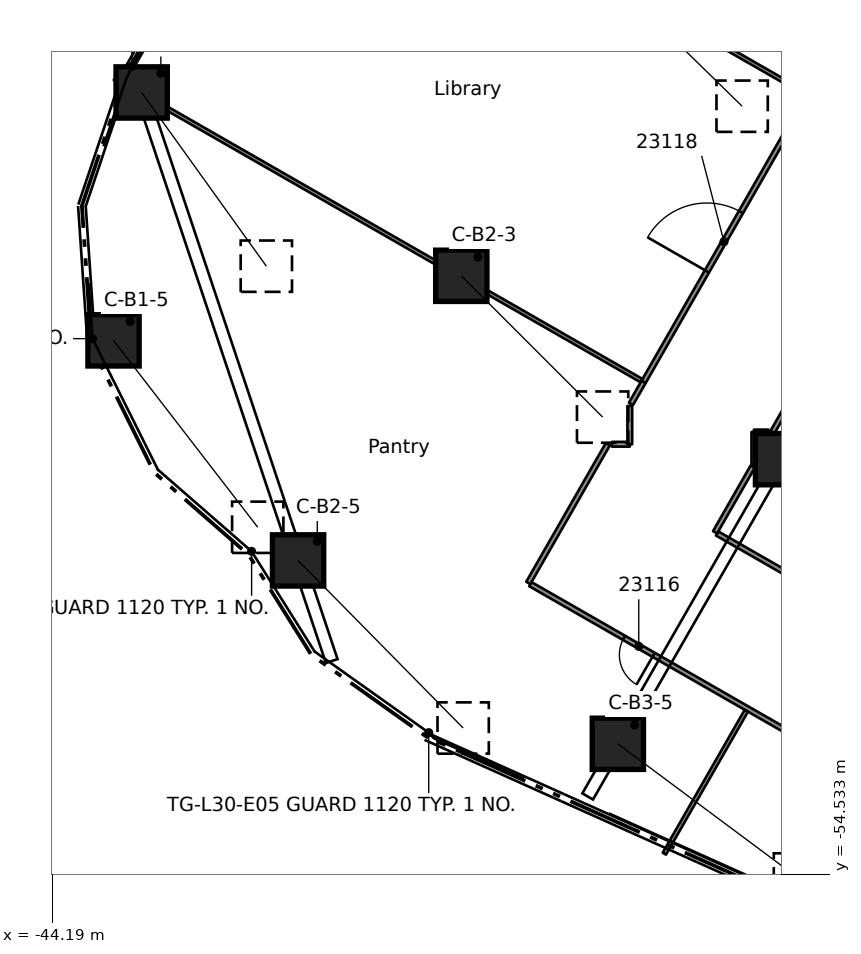
"""IFC4 building model, lengths in metres.
Left out: names, types, materials, properties, quantities, classifications, styles, units other than length and angle.
Written with IfcOpenShell. Run it as: python <this file> out.ifc"""

import sys

from ifc_helpers import new_model, si_unit, direction, frame, frame_2d, origin, origin_2d, place, context, subcontext, project, spatial, rectangle, extrude, element, fill, save


model = new_model("IFC4")
c1 = context("Model", 3, precision=1e-05, world=origin(), true_north=direction((0.0, 1.0)))
c2 = subcontext(c1, "Body", "Model", "MODEL_VIEW")
j1 = project(units=[si_unit("LENGTHUNIT", "METRE"), si_unit("PLANEANGLEUNIT", "RADIAN")], contexts=[c1])
p1 = place(None, origin())
s1 = spatial("IfcSite", under=j1, at=p1, CompositionType="ELEMENT")
p2 = place(p1, origin())
s2 = spatial("IfcBuilding", under=s1, at=p2, CompositionType="ELEMENT")
p3 = place(p2, frame((0.0, 0.0, 119.7)))
s3 = spatial("IfcBuildingStorey", under=s2, at=p3, CompositionType="ELEMENT", Elevation=119.7)
p4 = place(p3, frame((-41.832, -33.956, 0.605), z_axis=(0.522399558772, -0.727798715596, 0.44430589752), x_axis=(0.812388559252, 0.583116479613, 0.0)))
e1 = element("IfcColumn", 1, at=p4, inside=s3, PredefinedType="COLUMN", context=c2, shape_type="SweptSolid", body=[
    extrude(rectangle(XDim=1.35, YDim=1.35, at=origin_2d()), origin(), (0.0, 0.0, 1.0), 6.281),
])
p5 = place(p3, frame((-42.572, -40.479, 0.617), z_axis=(0.558056931018, -0.723205019199, 0.406874626816), x_axis=(0.791699702042, 0.610910453165, 0.0)))
e2 = element("IfcColumn", 2, at=p5, inside=s3, PredefinedType="COLUMN", context=c2, shape_type="SweptSolid", body=[
    extrude(rectangle(XDim=1.35, YDim=1.35, at=origin_2d()), origin(), (0.0, 0.0, 1.0), 6.8),
])
p6 = place(p3, frame((-29.126, -31.29, 0.562), z_axis=(0.59544523528, -0.58257531381, 0.553218741116), x_axis=(0.699339877275, 0.714789294865, 0.0)))
e3 = element("IfcColumn", 3, at=p6, inside=s3, PredefinedType="COLUMN", context=c2, shape_type="SweptSolid", body=[
    extrude(rectangle(XDim=1.35, YDim=1.35, at=origin_2d()), origin(), (0.0, 0.0, 1.0), 5.198),
])
p7 = place(p3, frame((-33.421, -38.78, 0.595), z_axis=(0.623782368225, -0.623618570583, 0.471163915761), x_axis=(0.707013924092, 0.707199626088, 0.0)))
e4 = element("IfcColumn", 4, at=p7, inside=s3, PredefinedType="COLUMN", context=c2, shape_type="SweptSolid", body=[
    extrude(rectangle(XDim=1.35, YDim=1.35, at=origin_2d()), origin(), (0.0, 0.0, 1.0), 5.962),
])
p8 = place(p3, frame((-37.716, -46.269, 0.616), z_axis=(0.640646488599, -0.650367983115, 0.408158747528), x_axis=(0.712411182905, 0.701762286299, 0.0)))
e5 = element("IfcColumn", 5, at=p8, inside=s3, PredefinedType="COLUMN", context=c2, shape_type="SweptSolid", body=[
    extrude(rectangle(XDim=1.35, YDim=1.35, at=origin_2d()), origin(), (0.0, 0.0, 1.0), 6.781),
])
p9 = place(p3, frame((-25.007, -43.605, 0.589), z_axis=(0.718653578755, -0.495359605874, 0.488012186948), x_axis=(0.567528313926, 0.823353880718, 0.0)))
e6 = element("IfcColumn", 6, at=p9, inside=s3, PredefinedType="COLUMN", context=c2, shape_type="SweptSolid", body=[
    extrude(rectangle(XDim=1.35, YDim=1.35, at=origin_2d()), origin(), (0.0, 0.0, 1.0), 5.782),
])
p10 = place(p3, frame((-29.301, -51.094, 0.612), z_axis=(0.727106660738, -0.54112250338, 0.422495373047), x_axis=(0.597024879734, 0.802222720308, 0.0)))
e7 = element("IfcColumn", 7, at=p10, inside=s3, PredefinedType="COLUMN", context=c2, shape_type="SweptSolid", body=[
    extrude(rectangle(XDim=1.35, YDim=1.35, at=origin_2d()), origin(), (0.0, 0.0, 1.0), 6.571),
])
p11 = place(p3, frame((-20.171, -53.449, 0.0), z_axis=(0.0, 0.0, 1.0), x_axis=(-0.867500052813, 0.497437089861, 0.0)))
e8 = element("IfcWall", 8, at=p11, inside=s3, PredefinedType="PARTITIONING", context=c2, shape_type="SweptSolid", body=[
    extrude(rectangle(XDim=13.179, YDim=0.125, at=frame_2d((6.59, 0.0))), origin(), (0.0, 0.0, 1.0), 3.58),
])
p12 = place(p11, frame((2.292, 0.0, 0.0)))
e9 = element("IfcOpeningElement", 9, at=p12, cuts=e8, PredefinedType="OPENING", context=c2, shape_type="SweptSolid", body=[
    extrude(rectangle(XDim=1.8, YDim=2.1, at=frame_2d((0.9, 1.05))), frame((0.0, 0.073, 0.0), z_axis=(0.0, -1.0, 0.0), x_axis=(1.0, 0.0, 0.0)), (0.0, 0.0, 1.0), 0.145),
])
p13 = place(p11, frame((9.441, 0.0, 0.0)))
e10 = element("IfcOpeningElement", 10, at=p13, cuts=e8, PredefinedType="OPENING", context=c2, shape_type="SweptSolid", body=[
    extrude(rectangle(XDim=0.9, YDim=2.1, at=frame_2d((0.45, 1.05))), frame((0.0, 0.073, 0.0), z_axis=(0.0, -1.0, 0.0), x_axis=(1.0, 0.0, 0.0)), (0.0, 0.0, 1.0), 0.145),
])
p14 = place(p3, frame((-26.689, -45.56, 0.0), z_axis=(0.0, 0.0, 1.0), x_axis=(0.867459879492, -0.497507143136, 0.0)))
e11 = element("IfcWall", 11, at=p14, inside=s3, PredefinedType="PARTITIONING", context=c2, shape_type="SweptSolid", body=[
    extrude(rectangle(XDim=5.974, YDim=0.125, at=frame_2d((2.987, 0.0))), origin(), (0.0, 0.0, 1.0), 3.58),
])
p15 = place(p3, frame((-42.542, -33.587, 0.0), z_axis=(0.0, 0.0, 1.0), x_axis=(0.867452469996, -0.497520062206, 0.0)))
e12 = element("IfcWall", 12, at=p15, inside=s3, PredefinedType="PARTITIONING", context=c2, shape_type="SweptSolid", body=[
    extrude(rectangle(XDim=15.984, YDim=0.1, at=frame_2d((7.992, 0.0))), origin(), (0.0, 0.0, 1.0), 3.58),
])
p16 = place(p3, frame((-38.261, -26.013, 0.0), z_axis=(0.0, 0.0, 1.0), x_axis=(0.867479537308, -0.497472865945, 0.0)))
e13 = element("IfcWall", 13, at=p16, inside=s3, PredefinedType="PARTITIONING", context=c2, shape_type="SweptSolid", body=[
    extrude(rectangle(XDim=16.037, YDim=0.1, at=frame_2d((8.019, 0.0))), origin(), (0.0, 0.0, 1.0), 3.58),
])
p17 = place(p3, frame((-29.458, -43.212, 0.0), z_axis=(0.0, 0.0, 1.0), x_axis=(1.0, 0.0, 0.0)))
e14 = element("IfcWall", 14, at=p17, inside=s3, PredefinedType="PARTITIONING", context=c2, shape_type="SweptSolid", body=[
    extrude(rectangle(XDim=0.471, YDim=0.125, at=frame_2d((0.235, 0.0))), origin(), (0.0, 0.0, 1.0), 3.58),
])
p18 = place(p3, frame((-25.722, -42.89, 0.0), z_axis=(0.0, 0.0, 1.0), x_axis=(1.0, 0.0, 0.0)))
e15 = element("IfcWall", 15, at=p18, inside=s3, PredefinedType="PARTITIONING", context=c2, shape_type="SweptSolid", body=[
    extrude(rectangle(XDim=0.384, YDim=0.125, at=frame_2d((0.192, 0.0))), origin(), (0.0, 0.0, 1.0), 3.58),
])
p19 = place(p3, frame((-28.956, -42.15, 0.0), z_axis=(0.0, 0.0, 1.0), x_axis=(0.498025161268, 0.867162579188, 0.0)))
e16 = element("IfcWall", 16, at=p19, inside=s3, PredefinedType="PARTITIONING", context=c2, shape_type="SweptSolid", body=[
    extrude(rectangle(XDim=0.669, YDim=0.125, at=frame_2d((0.334, 0.0))), origin(), (0.0, 0.0, 1.0), 3.58),
])
p20 = place(p3, frame((-28.078, -53.986, 0.0), z_axis=(0.0, 0.0, 1.0), x_axis=(0.497575033099, 0.867420939588, 0.0)))
e17 = element("IfcWall", 17, at=p20, inside=s3, PredefinedType="PARTITIONING", context=c2, shape_type="SweptSolid", body=[
    extrude(rectangle(XDim=4.337, YDim=0.1, at=frame_2d((2.168, 0.0))), origin(), (0.0, 0.0, 1.0), 3.58),
])
p21 = place(p3, frame((-21.458, -36.312, 0.0), z_axis=(0.0, 0.0, 1.0), x_axis=(-0.497504635005, -0.867461317955, 0.0)))
e18 = element("IfcWall", 18, at=p21, inside=s3, PredefinedType="PARTITIONING", context=c2, shape_type="SweptSolid", body=[
    extrude(rectangle(XDim=7.582, YDim=0.125, at=frame_2d((3.791, 0.0))), origin(), (0.0, 0.0, 1.0), 3.58),
])
p22 = place(p21, frame((3.288, 0.0, 0.0)))
e19 = element("IfcOpeningElement", 19, at=p22, cuts=e18, PredefinedType="OPENING", context=c2, shape_type="SweptSolid", body=[
    extrude(rectangle(XDim=1.1, YDim=2.1, at=frame_2d((0.55, 1.05))), frame((0.0, 0.073, 0.0), z_axis=(0.0, -1.0, 0.0), x_axis=(1.0, 0.0, 0.0)), (0.0, 0.0, 1.0), 0.145),
])
p23 = place(p3, frame((-26.743, -45.529, 0.0), z_axis=(0.0, 0.0, 1.0), x_axis=(0.497102378574, 0.867691895327, 0.0)))
e20 = element("IfcWall", 20, at=p23, inside=s3, PredefinedType="PARTITIONING", context=c2, shape_type="SweptSolid", body=[
    extrude(rectangle(XDim=1.991, YDim=0.125, at=frame_2d((0.996, 0.0))), origin(), (0.0, 0.0, 1.0), 3.58),
])
p24 = place(p3, frame((-31.658, -46.861, 0.0), z_axis=(0.0, 0.0, 1.0), x_axis=(0.497457512101, 0.867488342085, 0.0)))
e21 = element("IfcWall", 21, at=p24, inside=s3, PredefinedType="PARTITIONING", context=c2, shape_type="SweptSolid", body=[
    extrude(rectangle(XDim=4.206, YDim=0.125, at=frame_2d((2.103, 0.0))), origin(), (0.0, 0.0, 1.0), 3.58),
])
p25 = place(p3, frame((-28.623, -41.57, 0.0), z_axis=(0.0, 0.0, 1.0), x_axis=(0.497445996274, 0.867494945686, 0.0)))
e22 = element("IfcWall", 22, at=p25, inside=s3, PredefinedType="PARTITIONING", context=c2, shape_type="SweptSolid", body=[
    extrude(rectangle(XDim=19.081, YDim=0.125, at=frame_2d((9.541, 0.0))), origin(), (0.0, 0.0, 1.0), 3.58),
])
p26 = place(p25, frame((11.051, 0.0, 0.0)))
e23 = element("IfcOpeningElement", 23, at=p26, cuts=e22, PredefinedType="OPENING", context=c2, shape_type="SweptSolid", body=[
    extrude(rectangle(XDim=1.8, YDim=2.1, at=frame_2d((0.9, 1.05))), frame((0.0, 0.073, 0.0), z_axis=(0.0, -1.0, 0.0), x_axis=(1.0, 0.0, 0.0)), (0.0, 0.0, 1.0), 0.145),
])
p27 = place(p25, frame((3.35, 0.0, 0.0)))
e24 = element("IfcOpeningElement", 24, at=p27, cuts=e22, PredefinedType="OPENING", context=c2, shape_type="SweptSolid", body=[
    extrude(rectangle(XDim=1.8, YDim=2.1, at=frame_2d((0.9, 1.05))), frame((0.0, 0.073, 0.0), z_axis=(0.0, -1.0, 0.0), x_axis=(1.0, 0.0, 0.0)), (0.0, 0.0, 1.0), 0.145),
])
p28 = place(p3, frame((-25.722, -43.747, 0.0), z_axis=(0.0, 0.0, 1.0), x_axis=(0.0, 1.0, 0.0)))
e25 = element("IfcWall", 25, at=p28, inside=s3, PredefinedType="PARTITIONING", context=c2, shape_type="SweptSolid", body=[
    extrude(rectangle(XDim=0.857, YDim=0.125, at=frame_2d((0.429, 0.0))), origin(), (0.0, 0.0, 1.0), 3.58),
])
p29 = place(p3, frame((-28.987, -43.212, 0.0), z_axis=(0.0, 0.0, 1.0), x_axis=(0.0, 1.0, 0.0)))
e26 = element("IfcWall", 26, at=p29, inside=s3, PredefinedType="PARTITIONING", context=c2, shape_type="SweptSolid", body=[
    extrude(rectangle(XDim=1.008, YDim=0.125, at=frame_2d((0.504, 0.0))), origin(), (0.0, 0.0, 1.0), 3.58),
])
p30 = place(p13, origin())
e27 = element("IfcDoor", 27, at=p30, inside=s3, OperationType="SINGLE_SWING_RIGHT", PredefinedType="DOOR", context=c2, shape_type="SweptSolid", body=[
    extrude(rectangle(XDim=0.9, YDim=2.1, at=frame_2d((0.45, 1.05))), frame((0.0, 0.025, 0.0), z_axis=(0.0, -1.0, 0.0), x_axis=(1.0, 0.0, 0.0)), (0.0, 0.0, 1.0), 0.05),
])
fill(e10, e27)
p31 = place(p27, origin())
e28 = element("IfcDoor", 28, at=p31, inside=s3, OperationType="DOUBLE_DOOR_SINGLE_SWING", PredefinedType="DOOR", context=c2, shape_type="SweptSolid", body=[
    extrude(rectangle(XDim=1.8, YDim=2.1, at=frame_2d((0.9, 1.05))), frame((0.0, 0.025, 0.0), z_axis=(0.0, -1.0, 0.0), x_axis=(1.0, 0.0, 0.0)), (0.0, 0.0, 1.0), 0.05),
])
fill(e24, e28)
save(model, sys.argv[1])
